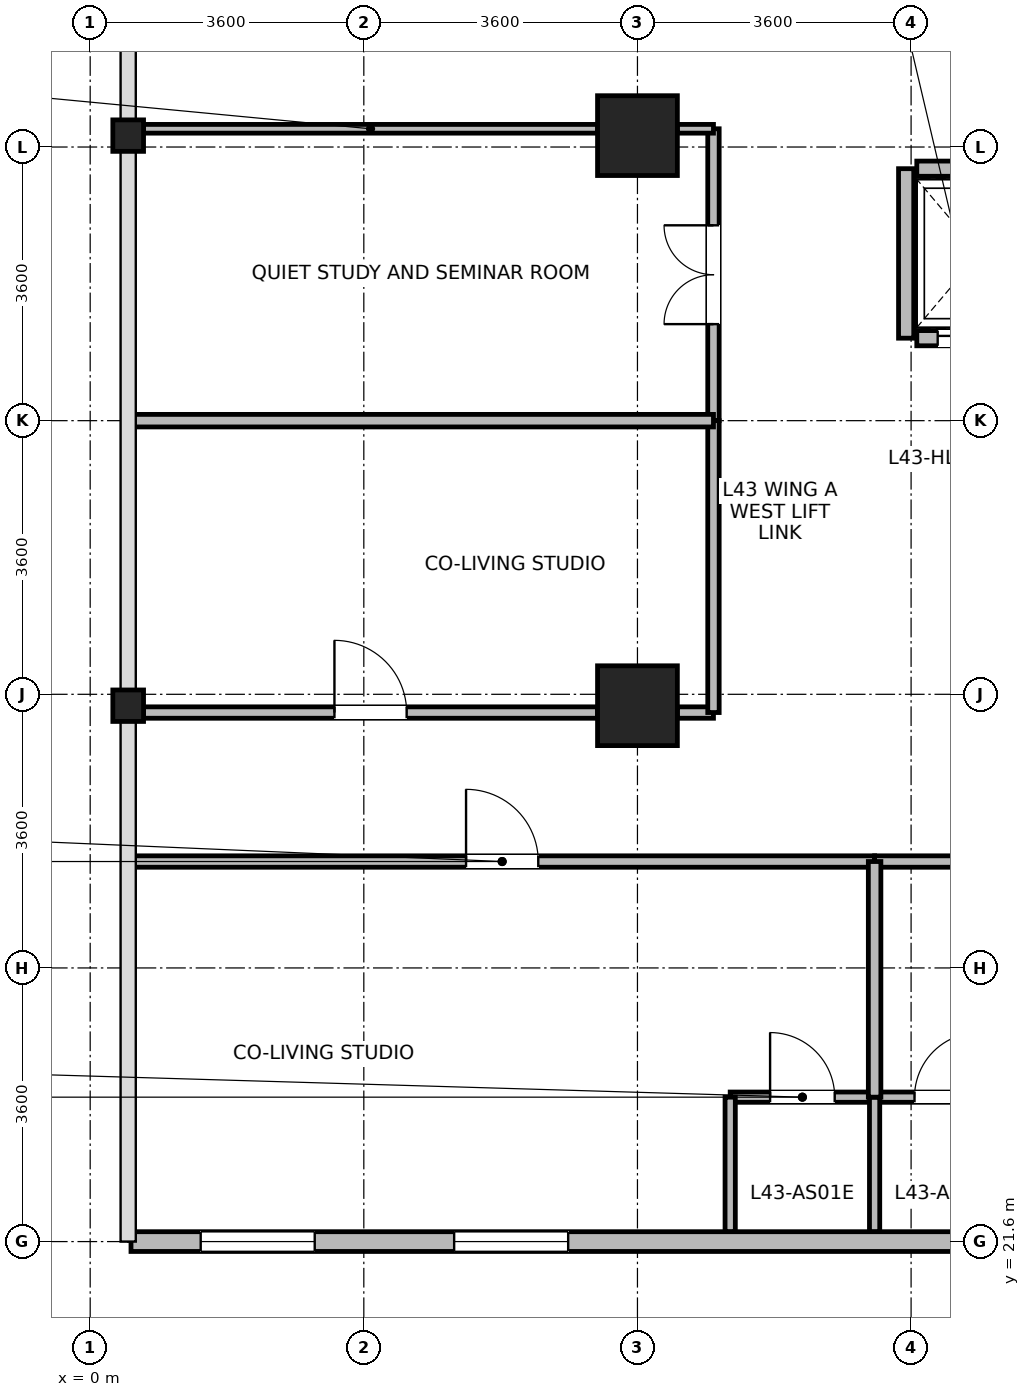
"""IFC4 building model, lengths in metres.
Left out: names, types, materials, properties, quantities, classifications, styles, units other than length and angle.
Written with IfcOpenShell. Run it as: python <this file> out.ifc"""

import sys

from ifc_helpers import new_model, si_unit, direction, frame, frame_2d, origin, origin_2d, place, context, subcontext, project, spatial, rectangle, i_section, extrude, source, transform, mapped, element, fill, save


model = new_model("IFC4")
c1 = context("Model", 3, precision=1e-05, world=origin(), true_north=direction((0.0, 1.0)))
c2 = subcontext(c1, "Body", "Model", "MODEL_VIEW")
j1 = project(units=[si_unit("LENGTHUNIT", "METRE"), si_unit("PLANEANGLEUNIT", "RADIAN")], contexts=[c1])
p1 = place(None, origin())
s1 = spatial("IfcSite", under=j1, at=p1, CompositionType="ELEMENT")
p2 = place(p1, origin())
s2 = spatial("IfcBuilding", under=s1, at=p2, CompositionType="ELEMENT")
p3 = place(p2, frame((0.0, 0.0, 169.8)))
s3 = spatial("IfcBuildingStorey", under=s2, at=p3, CompositionType="ELEMENT", Elevation=169.8)
m1 = source(origin(), c2, "Body", "SweptSolid", [
    extrude(rectangle(XDim=1.05, YDim=1.05, at=origin_2d()), origin(), (0.0, 0.0, 1.0), 3.7),
])
for number, where, z_axis, x_axis in (
    (1, (7.2, 28.65, 0.0), (0.0, 0.0, 1.0), (1.0, 0.0, 0.0)),
    (2, (7.2, 36.15, 0.0), (0.0, 0.0, 1.0), (1.0, 0.0, 0.0)),
):
    element("IfcColumn", number, at=place(p3, frame(where, z_axis=z_axis, x_axis=x_axis)), inside=s3, PredefinedType="COLUMN", context=c2, shape_type="MappedRepresentation", body=[
        mapped(m1, transform((0.0, 0.0, 0.0), x_axis=(1.0, 0.0, 0.0), y_axis=(0.0, 1.0, 0.0), z_axis=(0.0, 0.0, 1.0), scale=1.0)),
    ])
m2 = source(origin(), c2, "Body", "SweptSolid", [
    extrude(i_section(OverallWidth=0.404, OverallDepth=0.414, WebThickness=0.021, FlangeThickness=0.028, FilletRadius=0.015, at=origin_2d()), origin(), (0.0, 0.0, 1.0), 3.7),
])
for number, where, z_axis, x_axis in (
    (3, (0.5, 28.65, 0.0), (0.0, 0.0, 1.0), (1.0, 0.0, 0.0)),
    (4, (0.5, 36.15, 0.0), (0.0, 0.0, 1.0), (1.0, 0.0, 0.0)),
):
    element("IfcColumn", number, at=place(p3, frame(where, z_axis=z_axis, x_axis=x_axis)), inside=s3, PredefinedType="COLUMN", context=c2, shape_type="MappedRepresentation", body=[
        mapped(m2, transform((0.0, 0.0, 0.0), x_axis=(1.0, 0.0, 0.0), y_axis=(0.0, 1.0, 0.0), z_axis=(0.0, 0.0, 1.0), scale=1.0)),
    ])
p4 = place(p3, frame((13.874, 21.6, 0.0), z_axis=(0.0, 0.0, 1.0), x_axis=(-1.0, 0.0, 0.0)))
e5 = element("IfcWall", 5, at=p4, inside=s3, PredefinedType="STANDARD", context=c2, shape_type="SweptSolid", body=[
    extrude(rectangle(XDim=13.337, YDim=0.26, at=frame_2d((6.668, 0.0))), origin(), (0.0, 0.0, 1.0), 3.44),
])
p5 = place(p4, frame((7.586, 0.0, 0.85)))
e6 = element("IfcOpeningElement", 6, at=p5, cuts=e5, PredefinedType="OPENING", context=c2, shape_type="SweptSolid", body=[
    extrude(rectangle(XDim=1.5, YDim=1.85, at=frame_2d((0.75, 0.925))), frame((0.0, 0.14, 0.0), z_axis=(0.0, -1.0, 0.0), x_axis=(1.0, 0.0, 0.0)), (0.0, 0.0, 1.0), 0.28),
])
p6 = place(p4, frame((10.92, 0.0, 0.85)))
e7 = element("IfcOpeningElement", 7, at=p6, cuts=e5, PredefinedType="OPENING", context=c2, shape_type="SweptSolid", body=[
    extrude(rectangle(XDim=1.5, YDim=1.85, at=frame_2d((0.75, 0.925))), frame((0.0, 0.14, 0.0), z_axis=(0.0, -1.0, 0.0), x_axis=(1.0, 0.0, 0.0)), (0.0, 0.0, 1.0), 0.28),
])
p7 = place(p3, frame((10.875, 33.485, 0.0), z_axis=(0.0, 0.0, 1.0), x_axis=(1.0, 0.0, 0.0)))
e8 = element("IfcWall", 8, at=p7, inside=s3, PredefinedType="PARTITIONING", context=c2, shape_type="SweptSolid", body=[
    extrude(rectangle(XDim=1.65, YDim=0.2, at=frame_2d((0.825, 0.0))), origin(), (0.0, 0.0, 1.0), 3.44),
])
p8 = place(p7, frame((0.275, 0.0, 0.0)))
e9 = element("IfcOpeningElement", 9, at=p8, cuts=e8, PredefinedType="OPENING", context=c2, shape_type="SweptSolid", body=[
    extrude(rectangle(XDim=1.1, YDim=2.12, at=frame_2d((0.55, 1.06))), frame((0.0, 0.11, 0.0), z_axis=(0.0, -1.0, 0.0), x_axis=(1.0, 0.0, 0.0)), (0.0, 0.0, 1.0), 0.22),
])
p9 = place(p3, frame((10.875, 35.715, 0.0), z_axis=(0.0, 0.0, 1.0), x_axis=(1.0, 0.0, 0.0)))
e10 = element("IfcWall", 10, at=p9, inside=s3, PredefinedType="PARTITIONING", context=c2, shape_type="SweptSolid", body=[
    extrude(rectangle(XDim=1.65, YDim=0.2, at=frame_2d((0.825, 0.0))), origin(), (0.0, 0.0, 1.0), 3.44),
])
p10 = place(p3, frame((10.735, 33.485, 0.0), z_axis=(0.0, 0.0, 1.0), x_axis=(0.0, 1.0, 0.0)))
e11 = element("IfcWall", 11, at=p10, inside=s3, PredefinedType="PARTITIONING", context=c2, shape_type="SweptSolid", body=[
    extrude(rectangle(XDim=2.23, YDim=0.2, at=frame_2d((1.115, 0.0))), origin(), (0.0, 0.0, 1.0), 3.44),
])
p11 = place(p3, frame((8.42, 23.5, 0.0), z_axis=(0.0, 0.0, 1.0), x_axis=(1.0, 0.0, 0.0)))
e12 = element("IfcWall", 12, at=p11, inside=s3, PredefinedType="PARTITIONING", context=c2, shape_type="SweptSolid", body=[
    extrude(rectangle(XDim=1.9, YDim=0.135, at=frame_2d((0.95, 0.0))), origin(), (0.0, 0.0, 1.0), 3.44),
])
p12 = place(p11, frame((0.525, 0.0, 0.0)))
e13 = element("IfcOpeningElement", 13, at=p12, cuts=e12, PredefinedType="OPENING", context=c2, shape_type="SweptSolid", body=[
    extrude(rectangle(XDim=0.85, YDim=2.04, at=frame_2d((0.425, 1.02))), frame((0.0, 0.078, 0.0), z_axis=(0.0, -1.0, 0.0), x_axis=(1.0, 0.0, 0.0)), (0.0, 0.0, 1.0), 0.155),
])
p13 = place(p3, frame((10.32, 23.5, 0.0), z_axis=(0.0, 0.0, 1.0), x_axis=(1.0, 0.0, 0.0)))
e14 = element("IfcWall", 14, at=p13, inside=s3, PredefinedType="PARTITIONING", context=c2, shape_type="SweptSolid", body=[
    extrude(rectangle(XDim=1.9, YDim=0.135, at=frame_2d((0.95, 0.0))), origin(), (0.0, 0.0, 1.0), 3.44),
])
p14 = place(p13, frame((0.525, 0.0, 0.0)))
e15 = element("IfcOpeningElement", 15, at=p14, cuts=e14, PredefinedType="OPENING", context=c2, shape_type="SweptSolid", body=[
    extrude(rectangle(XDim=0.85, YDim=2.04, at=frame_2d((0.425, 1.02))), frame((0.0, 0.078, 0.0), z_axis=(0.0, -1.0, 0.0), x_axis=(1.0, 0.0, 0.0)), (0.0, 0.0, 1.0), 0.155),
])
for number, where, z_axis, x_axis in (
    (16, (8.42, 21.732, 0.0), (0.0, 0.0, 1.0), (0.0, 1.0, 0.0)),
    (17, (10.32, 21.732, 0.0), (0.0, 0.0, 1.0), (0.0, 1.0, 0.0)),
):
    element("IfcWall", number, at=place(p3, frame(where, z_axis=z_axis, x_axis=x_axis)), inside=s3, PredefinedType="PARTITIONING", context=c2, shape_type="SweptSolid", body=[
        extrude(rectangle(XDim=1.768, YDim=0.135, at=frame_2d((0.884, 0.0))), origin(), (0.0, 0.0, 1.0), 3.44),
    ])
p15 = place(p3, frame((0.52, 26.6, 0.0), z_axis=(0.0, 0.0, 1.0), x_axis=(1.0, 0.0, 0.0)))
e18 = element("IfcWall", 18, at=p15, inside=s3, PredefinedType="PARTITIONING", context=c2, shape_type="SweptSolid", body=[
    extrude(rectangle(XDim=9.8, YDim=0.15, at=frame_2d((4.9, 0.0))), origin(), (0.0, 0.0, 1.0), 3.44),
])
p16 = place(p15, frame((4.425, 0.0, 0.0)))
e19 = element("IfcOpeningElement", 19, at=p16, cuts=e18, PredefinedType="OPENING", context=c2, shape_type="SweptSolid", body=[
    extrude(rectangle(XDim=0.95, YDim=2.1, at=frame_2d((0.475, 1.05))), frame((0.0, 0.085, 0.0), z_axis=(0.0, -1.0, 0.0), x_axis=(1.0, 0.0, 0.0)), (0.0, 0.0, 1.0), 0.17),
])
p17 = place(p3, frame((10.32, 26.6, 0.0), z_axis=(0.0, 0.0, 1.0), x_axis=(1.0, 0.0, 0.0)))
e20 = element("IfcWall", 20, at=p17, inside=s3, PredefinedType="PARTITIONING", context=c2, shape_type="SweptSolid", body=[
    extrude(rectangle(XDim=9.08, YDim=0.15, at=frame_2d((4.54, 0.0))), origin(), (0.0, 0.0, 1.0), 3.44),
])
p18 = place(p17, frame((4.065, 0.0, 0.0)))
e21 = element("IfcOpeningElement", 21, at=p18, cuts=e20, PredefinedType="OPENING", context=c2, shape_type="SweptSolid", body=[
    extrude(rectangle(XDim=0.95, YDim=2.1, at=frame_2d((0.475, 1.05))), frame((0.0, 0.085, 0.0), z_axis=(0.0, -1.0, 0.0), x_axis=(1.0, 0.0, 0.0)), (0.0, 0.0, 1.0), 0.17),
])
p19 = place(p3, frame((0.702, 28.56, 0.0), z_axis=(0.0, 0.0, 1.0), x_axis=(1.0, 0.0, 0.0)))
e22 = element("IfcWall", 22, at=p19, inside=s3, PredefinedType="PARTITIONING", context=c2, shape_type="SweptSolid", body=[
    extrude(rectangle(XDim=5.973, YDim=0.15, at=frame_2d((2.987, 0.0))), origin(), (0.0, 0.0, 1.0), 2.84),
])
p20 = place(p19, frame((2.511, 0.0, 0.0)))
e23 = element("IfcOpeningElement", 23, at=p20, cuts=e22, PredefinedType="OPENING", context=c2, shape_type="SweptSolid", body=[
    extrude(rectangle(XDim=0.95, YDim=2.1, at=frame_2d((0.475, 1.05))), frame((0.0, 0.085, 0.0), z_axis=(0.0, -1.0, 0.0), x_axis=(1.0, 0.0, 0.0)), (0.0, 0.0, 1.0), 0.17),
])
p21 = place(p3, frame((7.725, 28.56, 0.0), z_axis=(0.0, 0.0, 1.0), x_axis=(1.0, 0.0, 0.0)))
e24 = element("IfcWall", 24, at=p21, inside=s3, PredefinedType="PARTITIONING", context=c2, shape_type="SweptSolid", body=[
    extrude(rectangle(XDim=0.475, YDim=0.15, at=frame_2d((0.237, 0.0))), origin(), (0.0, 0.0, 1.0), 2.84),
])
p22 = place(p3, frame((8.2, 32.4, 0.0), z_axis=(0.0, 0.0, 1.0), x_axis=(0.0, 1.0, 0.0)))
e25 = element("IfcWall", 25, at=p22, inside=s3, PredefinedType="PARTITIONING", context=c2, shape_type="SweptSolid", body=[
    extrude(rectangle(XDim=3.84, YDim=0.15, at=frame_2d((1.92, 0.0))), origin(), (0.0, 0.0, 1.0), 3.44),
])
p23 = place(p22, frame((1.27, 0.0, 0.0)))
e26 = element("IfcOpeningElement", 26, at=p23, cuts=e25, PredefinedType="OPENING", context=c2, shape_type="SweptSolid", body=[
    extrude(rectangle(XDim=1.3, YDim=2.12, at=frame_2d((0.65, 1.06))), frame((0.0, 0.085, 0.0), z_axis=(0.0, -1.0, 0.0), x_axis=(1.0, 0.0, 0.0)), (0.0, 0.0, 1.0), 0.17),
])
p24 = place(p3, frame((8.2, 28.56, 0.0), z_axis=(0.0, 0.0, 1.0), x_axis=(0.0, 1.0, 0.0)))
e27 = element("IfcWall", 27, at=p24, inside=s3, PredefinedType="PARTITIONING", context=c2, shape_type="SweptSolid", body=[
    extrude(rectangle(XDim=3.84, YDim=0.15, at=frame_2d((1.92, 0.0))), origin(), (0.0, 0.0, 1.0), 3.44),
])
p25 = place(p3, frame((0.52, 32.4, 0.0), z_axis=(0.0, 0.0, 1.0), x_axis=(1.0, 0.0, 0.0)))
e28 = element("IfcWall", 28, at=p25, inside=s3, PredefinedType="PARTITIONING", context=c2, shape_type="SweptSolid", body=[
    extrude(rectangle(XDim=7.68, YDim=0.165, at=frame_2d((3.84, 0.0))), origin(), (0.0, 0.0, 1.0), 3.44),
])
p26 = place(p3, frame((0.702, 36.24, 0.0), z_axis=(0.0, 0.0, 1.0), x_axis=(1.0, 0.0, 0.0)))
e29 = element("IfcWall", 29, at=p26, inside=s3, PredefinedType="PARTITIONING", context=c2, shape_type="SweptSolid", body=[
    extrude(rectangle(XDim=5.973, YDim=0.115, at=frame_2d((2.987, 0.0))), origin(), (0.0, 0.0, 1.0), 2.84),
])
p27 = place(p3, frame((7.725, 36.24, 0.0), z_axis=(0.0, 0.0, 1.0), x_axis=(1.0, 0.0, 0.0)))
e30 = element("IfcWall", 30, at=p27, inside=s3, PredefinedType="PARTITIONING", context=c2, shape_type="SweptSolid", body=[
    extrude(rectangle(XDim=0.475, YDim=0.115, at=frame_2d((0.237, 0.0))), origin(), (0.0, 0.0, 1.0), 2.84),
])
p28 = place(p3, frame((10.32, 23.5, 0.0), z_axis=(0.0, 0.0, 1.0), x_axis=(0.0, 1.0, 0.0)))
e31 = element("IfcWall", 31, at=p28, inside=s3, PredefinedType="PARTITIONING", context=c2, shape_type="SweptSolid", body=[
    extrude(rectangle(XDim=3.1, YDim=0.165, at=frame_2d((1.55, 0.0))), origin(), (0.0, 0.0, 1.0), 3.44),
])
p29 = place(p5, origin())
e32 = element("IfcWindow", 32, at=p29, inside=s3, PartitioningType="SINGLE_PANEL", PredefinedType="WINDOW", context=c2, shape_type="SweptSolid", body=[
    extrude(rectangle(XDim=1.5, YDim=1.85, at=frame_2d((0.75, 0.925))), frame((0.0, 0.03, 0.0), z_axis=(0.0, -1.0, 0.0), x_axis=(1.0, 0.0, 0.0)), (0.0, 0.0, 1.0), 0.06),
])
fill(e6, e32)
p30 = place(p6, origin())
e33 = element("IfcWindow", 33, at=p30, inside=s3, PartitioningType="SINGLE_PANEL", PredefinedType="WINDOW", context=c2, shape_type="SweptSolid", body=[
    extrude(rectangle(XDim=1.5, YDim=1.85, at=frame_2d((0.75, 0.925))), frame((0.0, 0.03, 0.0), z_axis=(0.0, -1.0, 0.0), x_axis=(1.0, 0.0, 0.0)), (0.0, 0.0, 1.0), 0.06),
])
fill(e7, e33)
p31 = place(p8, origin())
e34 = element("IfcDoor", 34, at=p31, inside=s3, OperationType="SLIDING_TO_LEFT", PredefinedType="DOOR", context=c2, shape_type="SweptSolid", body=[
    extrude(rectangle(XDim=1.1, YDim=2.12, at=frame_2d((0.55, 1.06))), frame((0.0, 0.025, 0.0), z_axis=(0.0, -1.0, 0.0), x_axis=(1.0, 0.0, 0.0)), (0.0, 0.0, 1.0), 0.05),
])
fill(e9, e34)
p32 = place(p12, origin())
e35 = element("IfcDoor", 35, at=p32, inside=s3, OperationType="SINGLE_SWING_LEFT", PredefinedType="DOOR", context=c2, shape_type="SweptSolid", body=[
    extrude(rectangle(XDim=0.85, YDim=2.04, at=frame_2d((0.425, 1.02))), frame((0.0, 0.025, 0.0), z_axis=(0.0, -1.0, 0.0), x_axis=(1.0, 0.0, 0.0)), (0.0, 0.0, 1.0), 0.05),
])
fill(e13, e35)
p33 = place(p14, origin())
e36 = element("IfcDoor", 36, at=p33, inside=s3, OperationType="SINGLE_SWING_RIGHT", PredefinedType="DOOR", context=c2, shape_type="SweptSolid", body=[
    extrude(rectangle(XDim=0.85, YDim=2.04, at=frame_2d((0.425, 1.02))), frame((0.0, 0.025, 0.0), z_axis=(0.0, -1.0, 0.0), x_axis=(1.0, 0.0, 0.0)), (0.0, 0.0, 1.0), 0.05),
])
fill(e15, e36)
p34 = place(p16, origin())
e37 = element("IfcDoor", 37, at=p34, inside=s3, OperationType="SINGLE_SWING_LEFT", PredefinedType="DOOR", context=c2, shape_type="SweptSolid", body=[
    extrude(rectangle(XDim=0.95, YDim=2.1, at=frame_2d((0.475, 1.05))), frame((0.0, 0.025, 0.0), z_axis=(0.0, -1.0, 0.0), x_axis=(1.0, 0.0, 0.0)), (0.0, 0.0, 1.0), 0.05),
])
fill(e19, e37)
p35 = place(p20, origin())
e38 = element("IfcDoor", 38, at=p35, inside=s3, OperationType="SINGLE_SWING_LEFT", PredefinedType="DOOR", context=c2, shape_type="SweptSolid", body=[
    extrude(rectangle(XDim=0.95, YDim=2.1, at=frame_2d((0.475, 1.05))), frame((0.0, 0.025, 0.0), z_axis=(0.0, -1.0, 0.0), x_axis=(1.0, 0.0, 0.0)), (0.0, 0.0, 1.0), 0.05),
])
fill(e23, e38)
p36 = place(p23, origin())
e39 = element("IfcDoor", 39, at=p36, inside=s3, OperationType="DOUBLE_DOOR_SINGLE_SWING", PredefinedType="DOOR", context=c2, shape_type="SweptSolid", body=[
    extrude(rectangle(XDim=1.3, YDim=2.12, at=frame_2d((0.65, 1.06))), frame((0.0, 0.025, 0.0), z_axis=(0.0, -1.0, 0.0), x_axis=(1.0, 0.0, 0.0)), (0.0, 0.0, 1.0), 0.05),
])
fill(e26, e39)
save(model, sys.argv[1])
